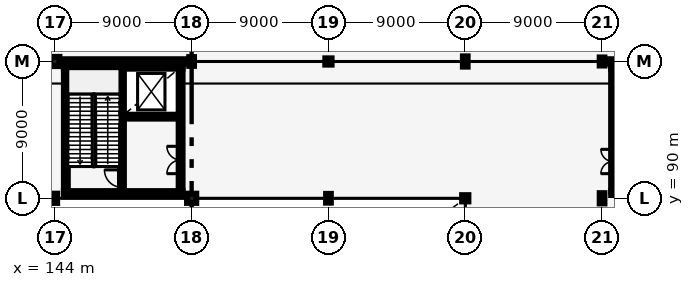
"""IFC4 building model, lengths in metres.
Left out: names, types, materials, properties, quantities, classifications, styles, units other than length and angle.
Written with IfcOpenShell. Run it as: python <this file> out.ifc"""

import sys

from ifc_helpers import new_model, si_unit, direction, frame, frame_2d, origin, origin_2d, place, context, subcontext, project, spatial, rectangle, hollow_circle, i_section, extrude, element, fill, save


model = new_model("IFC4")
c1 = context("Model", 3, precision=1e-05, world=origin(), true_north=direction((0.0, 1.0)))
c2 = subcontext(c1, "Body", "Model", "MODEL_VIEW")
j1 = project(units=[si_unit("LENGTHUNIT", "METRE"), si_unit("PLANEANGLEUNIT", "RADIAN")], contexts=[c1])
p1 = place(None, origin())
s1 = spatial("IfcSite", under=j1, at=p1, CompositionType="ELEMENT")
p2 = place(p1, origin())
s2 = spatial("IfcBuilding", under=s1, at=p2, CompositionType="ELEMENT")
p3 = place(p2, frame((0.0, 0.0, 12.0)))
s3 = spatial("IfcBuildingStorey", under=s2, at=p3, CompositionType="ELEMENT", Elevation=12.0)
p4 = place(p3, frame((144.0, 90.0, 0.0), z_axis=(0.0, 0.0, 1.0), x_axis=(1.0, 0.0, 0.0)))
e1 = element("IfcColumn", 1, at=p4, inside=s3, PredefinedType="COLUMN", context=c2, shape_type="SweptSolid", body=[
    extrude(i_section(OverallWidth=0.3, OverallDepth=0.6, WebThickness=0.015, FlangeThickness=0.03, FilletRadius=0.027, at=origin_2d()), origin(), (0.0, 0.0, 1.0), 6.0),
])
for number, where, z_axis, x_axis in (
    (2, (144.0, 99.0, 0.0), (0.0, 0.0, 1.0), (1.0, 0.0, 0.0)),
    (3, (153.0, 90.0, 0.0), (0.0, 0.0, 1.0), (1.0, 0.0, 0.0)),
):
    element("IfcColumn", number, at=place(p3, frame(where, z_axis=z_axis, x_axis=x_axis)), inside=s3, PredefinedType="COLUMN", context=c2, shape_type="SweptSolid", body=[
        extrude(rectangle(XDim=0.6, YDim=0.6, at=origin_2d()), origin(), (0.0, 0.0, 1.0), 6.0),
    ])
for number, where, z_axis, x_axis in (
    (4, (153.0, 99.0, 0.0), (0.0, 0.0, 1.0), (1.0, 0.0, 0.0)),
    (5, (162.0, 90.0, 0.0), (0.0, 0.0, 1.0), (1.0, 0.0, 0.0)),
):
    element("IfcColumn", number, at=place(p3, frame(where, z_axis=z_axis, x_axis=x_axis)), inside=s3, PredefinedType="COLUMN", context=c2, shape_type="SweptSolid", body=[
        extrude(i_section(OverallWidth=0.306, OverallDepth=0.572, WebThickness=0.021, FlangeThickness=0.04, FilletRadius=0.027, at=origin_2d()), origin(), (0.0, 0.0, 1.0), 6.0),
    ])
for number, where, z_axis, x_axis in (
    (6, (162.0, 99.0, 0.0), (0.0, 0.0, 1.0), (1.0, 0.0, 0.0)),
    (7, (171.0, 90.0, 0.0), (0.0, 0.0, 1.0), (1.0, 0.0, 0.0)),
):
    element("IfcColumn", number, at=place(p3, frame(where, z_axis=z_axis, x_axis=x_axis)), inside=s3, PredefinedType="COLUMN", context=c2, shape_type="SweptSolid", body=[
        extrude(hollow_circle(Radius=0.203, WallThickness=0.016, at=origin_2d()), origin(), (0.0, 0.0, 1.0), 6.0),
    ])
for number, where, z_axis, x_axis in (
    (8, (171.0, 99.0, 0.0), (0.0, 0.0, 1.0), (1.0, 0.0, 0.0)),
    (9, (180.0, 90.0, 0.0), (0.0, 0.0, 1.0), (1.0, 0.0, 0.0)),
):
    element("IfcColumn", number, at=place(p3, frame(where, z_axis=z_axis, x_axis=x_axis)), inside=s3, PredefinedType="COLUMN", context=c2, shape_type="SweptSolid", body=[
        extrude(i_section(OverallWidth=0.305, OverallDepth=0.668, WebThickness=0.021, FlangeThickness=0.04, FilletRadius=0.027, at=origin_2d()), origin(), (0.0, 0.0, 1.0), 6.0),
    ])
p5 = place(p3, frame((180.0, 99.0, 0.0), z_axis=(0.0, 0.0, 1.0), x_axis=(1.0, 0.0, 0.0)))
e10 = element("IfcColumn", 10, at=p5, inside=s3, PredefinedType="COLUMN", context=c2, shape_type="SweptSolid", body=[
    extrude(i_section(OverallWidth=0.306, OverallDepth=0.524, WebThickness=0.021, FlangeThickness=0.04, FilletRadius=0.027, at=origin_2d()), origin(), (0.0, 0.0, 1.0), 6.0),
])
p6 = place(p3, frame((144.295, 99.0, 0.0), z_axis=(0.0, 0.0, 1.0), x_axis=(1.0, 0.0, 0.0)))
e11 = element("IfcWall", 11, at=p6, inside=s3, PredefinedType="SOLIDWALL", context=c2, shape_type="SweptSolid", body=[
    extrude(rectangle(XDim=8.557, YDim=0.29, at=frame_2d((4.279, 0.0))), origin(), (0.0, 0.0, 1.0), 4.8),
])
p7 = place(p3, frame((180.148, 99.0, 0.0), z_axis=(0.0, 0.0, 1.0), x_axis=(1.0, 0.0, 0.0)))
e12 = element("IfcWall", 12, at=p7, inside=s3, PredefinedType="SOLIDWALL", context=c2, shape_type="SweptSolid", body=[
    extrude(rectangle(XDim=11.557, YDim=0.29, at=frame_2d((5.779, 0.0))), origin(), (0.0, 0.0, 1.0), 4.8),
])
p8 = place(p3, frame((180.725, 90.47, 0.0), z_axis=(0.0, 0.0, 1.0), x_axis=(0.0, 1.0, 0.0)))
e13 = element("IfcWall", 13, at=p8, inside=s3, PredefinedType="SHEAR", context=c2, shape_type="SweptSolid", body=[
    extrude(rectangle(XDim=8.06, YDim=0.25, at=frame_2d((4.03, 0.0))), origin(), (0.0, 0.0, 1.0), 5.64),
])
p9 = place(p8, frame((1.15, 0.0, 0.0)))
e14 = element("IfcOpeningElement", 14, at=p9, cuts=e13, PredefinedType="OPENING", context=c2, shape_type="SweptSolid", body=[
    extrude(rectangle(XDim=1.6, YDim=2.2, at=frame_2d((0.8, 1.1))), frame((0.0, 0.135, 0.0), z_axis=(0.0, -1.0, 0.0), x_axis=(1.0, 0.0, 0.0)), (0.0, 0.0, 1.0), 0.27),
])
for number, where, z_axis, x_axis in (
    (15, (180.6, 90.345, 0.0), (0.0, 0.0, 1.0), (1.0, 0.0, 0.0)),
    (16, (180.6, 98.655, 0.0), (0.0, 0.0, 1.0), (1.0, 0.0, 0.0)),
):
    element("IfcWall", number, at=place(p3, frame(where, z_axis=z_axis, x_axis=x_axis)), inside=s3, PredefinedType="SHEAR", context=c2, shape_type="SweptSolid", body=[
        extrude(rectangle(XDim=7.8, YDim=0.25, at=frame_2d((3.9, 0.0))), origin(), (0.0, 0.0, 1.0), 5.64),
    ])
p10 = place(p3, frame((144.725, 90.47, 0.0), z_axis=(0.0, 0.0, 1.0), x_axis=(0.0, 1.0, 0.0)))
e17 = element("IfcWall", 17, at=p10, inside=s3, PredefinedType="SHEAR", context=c2, shape_type="SweptSolid", body=[
    extrude(rectangle(XDim=8.06, YDim=0.25, at=frame_2d((4.03, 0.0))), origin(), (0.0, 0.0, 1.0), 5.64),
])
p11 = place(p3, frame((152.275, 90.47, 0.0), z_axis=(0.0, 0.0, 1.0), x_axis=(0.0, 1.0, 0.0)))
e18 = element("IfcWall", 18, at=p11, inside=s3, PredefinedType="SHEAR", context=c2, shape_type="SweptSolid", body=[
    extrude(rectangle(XDim=8.06, YDim=0.25, at=frame_2d((4.03, 0.0))), origin(), (0.0, 0.0, 1.0), 5.64),
])
p12 = place(p11, frame((1.15, 0.0, 0.0)))
e19 = element("IfcOpeningElement", 19, at=p12, cuts=e18, PredefinedType="OPENING", context=c2, shape_type="SweptSolid", body=[
    extrude(rectangle(XDim=1.8, YDim=2.2, at=frame_2d((0.9, 1.1))), frame((0.0, 0.135, 0.0), z_axis=(0.0, -1.0, 0.0), x_axis=(1.0, 0.0, 0.0)), (0.0, 0.0, 1.0), 0.27),
])
for number, where, z_axis, x_axis in (
    (20, (144.6, 90.345, 0.0), (0.0, 0.0, 1.0), (1.0, 0.0, 0.0)),
    (21, (144.6, 98.655, 0.0), (0.0, 0.0, 1.0), (1.0, 0.0, 0.0)),
):
    element("IfcWall", number, at=place(p3, frame(where, z_axis=z_axis, x_axis=x_axis)), inside=s3, PredefinedType="SHEAR", context=c2, shape_type="SweptSolid", body=[
        extrude(rectangle(XDim=7.8, YDim=0.25, at=frame_2d((3.9, 0.0))), origin(), (0.0, 0.0, 1.0), 5.64),
    ])
p13 = place(p3, frame((148.415, 90.47, 0.0), z_axis=(0.0, 0.0, 1.0), x_axis=(0.0, 1.0, 0.0)))
e22 = element("IfcWall", 22, at=p13, inside=s3, PredefinedType="SHEAR", context=c2, shape_type="SweptSolid", body=[
    extrude(rectangle(XDim=8.06, YDim=0.25, at=frame_2d((4.03, 0.0))), origin(), (0.0, 0.0, 1.0), 5.64),
])
p14 = place(p13, frame((0.25, 0.0, 0.0)))
e23 = element("IfcOpeningElement", 23, at=p14, cuts=e22, PredefinedType="OPENING", context=c2, shape_type="SweptSolid", body=[
    extrude(rectangle(XDim=1.15, YDim=2.15, at=frame_2d((0.575, 1.075))), frame((0.0, 0.135, 0.0), z_axis=(0.0, -1.0, 0.0), x_axis=(1.0, 0.0, 0.0)), (0.0, 0.0, 1.0), 0.27),
])
p15 = place(p3, frame((148.54, 95.37, 0.0), z_axis=(0.0, 0.0, 1.0), x_axis=(1.0, 0.0, 0.0)))
e24 = element("IfcWall", 24, at=p15, inside=s3, PredefinedType="SHEAR", context=c2, shape_type="SweptSolid", body=[
    extrude(rectangle(XDim=3.61, YDim=0.25, at=frame_2d((1.805, 0.0))), origin(), (0.0, 0.0, 1.0), 5.64),
])
p16 = place(p15, frame((0.95, 0.0, 0.0)))
e25 = element("IfcOpeningElement", 25, at=p16, cuts=e24, PredefinedType="OPENING", context=c2, shape_type="SweptSolid", body=[
    extrude(rectangle(XDim=1.2, YDim=2.2, at=frame_2d((0.6, 1.1))), frame((0.0, 0.135, 0.0), z_axis=(0.0, -1.0, 0.0), x_axis=(1.0, 0.0, 0.0)), (0.0, 0.0, 1.0), 0.27),
])
p17 = place(p9, origin())
e26 = element("IfcDoor", 26, at=p17, inside=s3, OperationType="DOUBLE_DOOR_SINGLE_SWING", PredefinedType="DOOR", context=c2, shape_type="SweptSolid", body=[
    extrude(rectangle(XDim=1.6, YDim=2.2, at=frame_2d((0.8, 1.1))), frame((0.0, 0.025, 0.0), z_axis=(0.0, -1.0, 0.0), x_axis=(1.0, 0.0, 0.0)), (0.0, 0.0, 1.0), 0.05),
])
fill(e14, e26)
p18 = place(p14, origin())
e27 = element("IfcDoor", 27, at=p18, inside=s3, OperationType="SINGLE_SWING_RIGHT", PredefinedType="DOOR", context=c2, shape_type="SweptSolid", body=[
    extrude(rectangle(XDim=1.15, YDim=2.15, at=frame_2d((0.575, 1.075))), frame((0.0, 0.025, 0.0), z_axis=(0.0, -1.0, 0.0), x_axis=(1.0, 0.0, 0.0)), (0.0, 0.0, 1.0), 0.05),
])
fill(e23, e27)
p19 = place(p16, origin())
e28 = element("IfcDoor", 28, at=p19, inside=s3, OperationType="DOUBLE_DOOR_SLIDING", PredefinedType="DOOR", context=c2, shape_type="SweptSolid", body=[
    extrude(rectangle(XDim=1.2, YDim=2.2, at=frame_2d((0.6, 1.1))), frame((0.0, 0.025, 0.0), z_axis=(0.0, -1.0, 0.0), x_axis=(1.0, 0.0, 0.0)), (0.0, 0.0, 1.0), 0.05),
])
fill(e25, e28)
p20 = place(p12, origin())
e29 = element("IfcDoor", 29, at=p20, inside=s3, OperationType="DOUBLE_DOOR_SINGLE_SWING", PredefinedType="DOOR", context=c2, shape_type="SweptSolid", body=[
    extrude(rectangle(XDim=1.8, YDim=2.2, at=frame_2d((0.9, 1.1))), frame((0.0, 0.025, 0.0), z_axis=(0.0, -1.0, 0.0), x_axis=(1.0, 0.0, 0.0)), (0.0, 0.0, 1.0), 0.05),
])
fill(e19, e29)
save(model, sys.argv[1])
